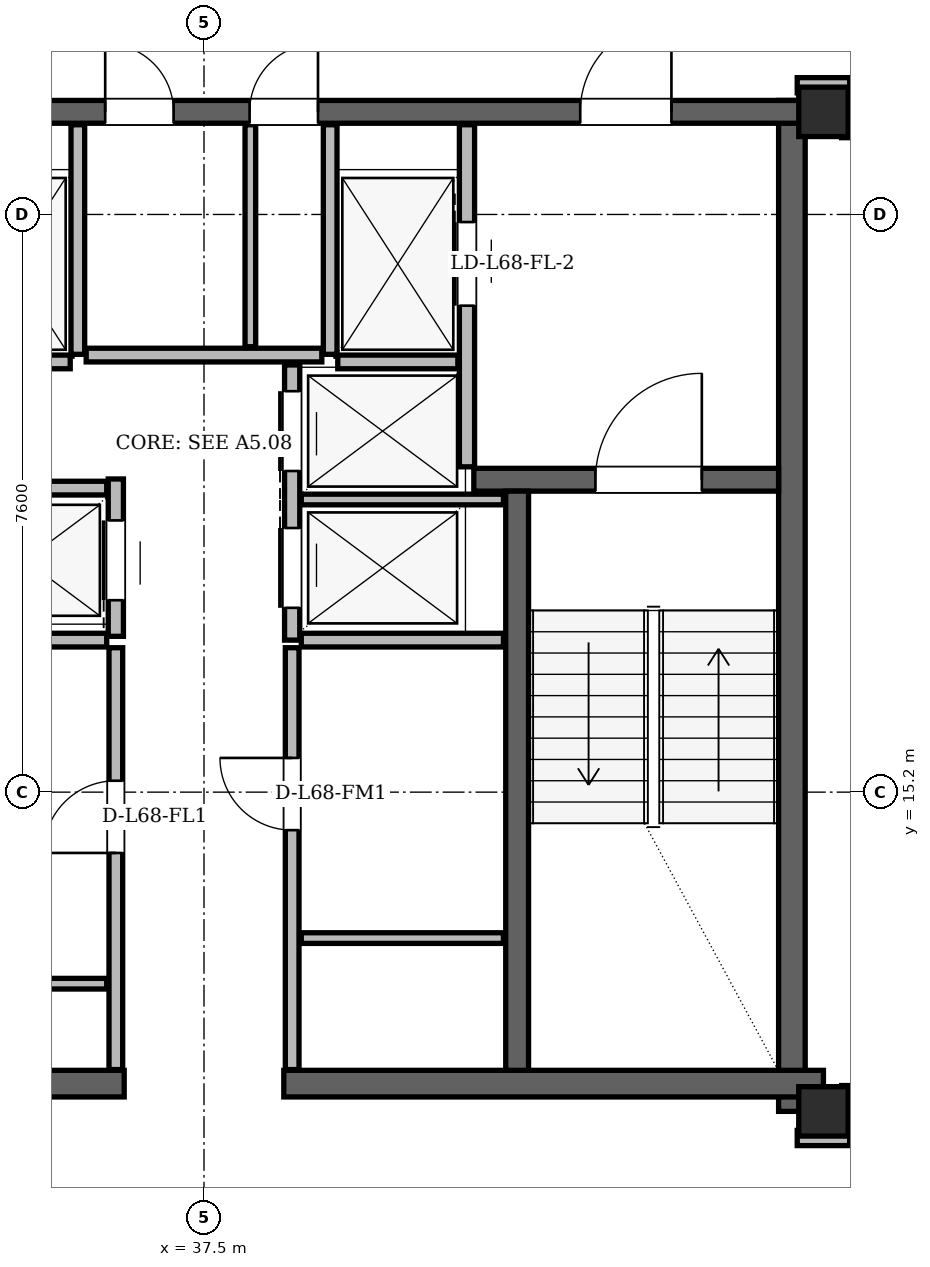
"""IFC4 building model, lengths in metres.
Left out: names, types, materials, properties, quantities, classifications, styles, units other than length and angle.
Written with IfcOpenShell. Run it as: python <this file> out.ifc"""

import sys

from ifc_helpers import new_model, si_unit, direction, frame, frame_2d, origin, origin_2d, place, context, subcontext, project, spatial, rectangle, hollow_rectangle, extrude, element, fill, save


model = new_model("IFC4")
c1 = context("Model", 3, precision=1e-05, world=origin(), true_north=direction((0.0, 1.0)))
c2 = subcontext(c1, "Body", "Model", "MODEL_VIEW")
j1 = project(units=[si_unit("LENGTHUNIT", "METRE"), si_unit("PLANEANGLEUNIT", "RADIAN")], contexts=[c1])
p1 = place(None, origin())
s1 = spatial("IfcSite", under=j1, at=p1, CompositionType="ELEMENT")
p2 = place(p1, origin())
s2 = spatial("IfcBuilding", under=s1, at=p2, CompositionType="ELEMENT")
p3 = place(p2, frame((0.0, 0.0, 257.7)))
s3 = spatial("IfcBuildingStorey", under=s2, at=p3, CompositionType="ELEMENT", Elevation=257.7)
for number, where, z_axis, x_axis in (
    (1, (45.65, 11.0, 0.0), (0.0, 0.0, 1.0), (1.0, 0.0, 0.0)),
    (2, (45.65, 24.15, 0.0), (0.0, 0.0, 1.0), (1.0, 0.0, 0.0)),
):
    element("IfcColumn", number, at=place(p3, frame(where, z_axis=z_axis, x_axis=x_axis)), inside=s3, PredefinedType="COLUMN", context=c2, shape_type="SweptSolid", body=[
        extrude(hollow_rectangle(XDim=0.65, YDim=0.65, WallThickness=0.05, at=origin_2d()), origin(), (0.0, 0.0, 1.0), 3.9),
    ])
p4 = place(p3, frame((45.235, 11.0, 0.0), z_axis=(0.0, 0.0, 1.0), x_axis=(0.0, 1.0, 0.0)))
e3 = element("IfcWall", 3, at=p4, inside=s3, PredefinedType="SHEAR", context=c2, shape_type="SweptSolid", body=[
    extrude(rectangle(XDim=13.3, YDim=0.35, at=frame_2d((6.65, 0.0))), origin(), (0.0, 0.0, 1.0), 3.68),
])
for number, where, z_axis, x_axis in (
    (4, (29.35, 11.365, 0.0), (0.0, 0.0, 1.0), (1.0, 0.0, 0.0)),
    (5, (38.55, 11.365, 0.0), (0.0, 0.0, 1.0), (1.0, 0.0, 0.0)),
):
    element("IfcWall", number, at=place(p3, frame(where, z_axis=z_axis, x_axis=x_axis)), inside=s3, PredefinedType="SHEAR", context=c2, shape_type="SweptSolid", body=[
        extrude(rectangle(XDim=7.1, YDim=0.35, at=frame_2d((3.55, 0.0))), origin(), (0.0, 0.0, 1.0), 3.68),
    ])
p5 = place(p3, frame((29.65, 24.15, 0.0), z_axis=(0.0, 0.0, 1.0), x_axis=(1.0, 0.0, 0.0)))
e6 = element("IfcWall", 6, at=p5, inside=s3, PredefinedType="SHEAR", context=c2, shape_type="SweptSolid", body=[
    extrude(rectangle(XDim=15.7, YDim=0.3, at=frame_2d((7.85, 0.0))), origin(), (0.0, 0.0, 1.0), 3.68),
])
p6 = place(p5, frame((1.7, 0.0, 0.0)))
e7 = element("IfcOpeningElement", 7, at=p6, cuts=e6, PredefinedType="OPENING", context=c2, shape_type="SweptSolid", body=[
    extrude(rectangle(XDim=1.2, YDim=2.2, at=frame_2d((0.6, 1.1))), frame((0.0, 0.15, 0.0), z_axis=(0.0, -1.0, 0.0), x_axis=(1.0, 0.0, 0.0)), (0.0, 0.0, 1.0), 0.3),
])
p7 = place(p5, frame((12.8, 0.0, 0.0)))
e8 = element("IfcOpeningElement", 8, at=p7, cuts=e6, PredefinedType="OPENING", context=c2, shape_type="SweptSolid", body=[
    extrude(rectangle(XDim=1.2, YDim=2.2, at=frame_2d((0.6, 1.1))), frame((0.0, 0.15, 0.0), z_axis=(0.0, -1.0, 0.0), x_axis=(1.0, 0.0, 0.0)), (0.0, 0.0, 1.0), 0.3),
])
p8 = place(p5, frame((6.55, 0.0, 0.0)))
e9 = element("IfcOpeningElement", 9, at=p8, cuts=e6, PredefinedType="OPENING", context=c2, shape_type="SweptSolid", body=[
    extrude(rectangle(XDim=0.9, YDim=2.05, at=frame_2d((0.45, 1.025))), frame((0.0, 0.15, 0.0), z_axis=(0.0, -1.0, 0.0), x_axis=(1.0, 0.0, 0.0)), (0.0, 0.0, 1.0), 0.3),
])
p9 = place(p5, frame((8.45, 0.0, 0.0)))
e10 = element("IfcOpeningElement", 10, at=p9, cuts=e6, PredefinedType="OPENING", context=c2, shape_type="SweptSolid", body=[
    extrude(rectangle(XDim=0.9, YDim=2.05, at=frame_2d((0.45, 1.025))), frame((0.0, 0.15, 0.0), z_axis=(0.0, -1.0, 0.0), x_axis=(1.0, 0.0, 0.0)), (0.0, 0.0, 1.0), 0.3),
])
p10 = place(p3, frame((41.05, 19.31, 0.0), z_axis=(0.0, 0.0, 1.0), x_axis=(1.0, 0.0, 0.0)))
e11 = element("IfcWall", 11, at=p10, inside=s3, PredefinedType="SHEAR", context=c2, shape_type="SweptSolid", body=[
    extrude(rectangle(XDim=4.01, YDim=0.3, at=frame_2d((2.005, 0.0))), origin(), (0.0, 0.0, 1.0), 3.68),
])
p11 = place(p10, frame((1.6, 0.0, 0.0)))
e12 = element("IfcOpeningElement", 12, at=p11, cuts=e11, PredefinedType="OPENING", context=c2, shape_type="SweptSolid", body=[
    extrude(rectangle(XDim=1.4, YDim=2.2, at=frame_2d((0.7, 1.1))), frame((0.0, 0.15, 0.0), z_axis=(0.0, -1.0, 0.0), x_axis=(1.0, 0.0, 0.0)), (0.0, 0.0, 1.0), 0.3),
])
p12 = place(p3, frame((41.62, 11.54, 0.0), z_axis=(0.0, 0.0, 1.0), x_axis=(0.0, 1.0, 0.0)))
e13 = element("IfcWall", 13, at=p12, inside=s3, PredefinedType="SHEAR", context=c2, shape_type="SweptSolid", body=[
    extrude(rectangle(XDim=7.62, YDim=0.3, at=frame_2d((3.81, 0.0))), origin(), (0.0, 0.0, 1.0), 3.68),
])
p13 = place(p3, frame((58.693, 10.886, 0.0), z_axis=(0.0, 0.0, 1.0), x_axis=(-0.500001564453, 0.866024500545, 0.0)))
e14 = element("IfcWall", 14, at=p13, inside=s3, PredefinedType="SOLIDWALL", context=c2, shape_type="SweptSolid", body=[
    extrude(rectangle(XDim=37.152, YDim=0.29, at=frame_2d((18.576, 0.0))), origin(), (0.0, 0.0, 1.0), 3.058),
])
p14 = place(p13, frame((6.789, 0.0, 0.0)))
e15 = element("IfcOpeningElement", 15, at=p14, cuts=e14, PredefinedType="OPENING", context=c2, shape_type="SweptSolid", body=[
    extrude(rectangle(XDim=1.5, YDim=2.2, at=frame_2d((0.75, 1.1))), frame((0.0, 0.145, 0.0), z_axis=(0.0, -1.0, 0.0), x_axis=(1.0, 0.0, 0.0)), (0.0, 0.0, 1.0), 0.29),
])
p15 = place(p13, frame((28.247, 0.0, 0.0)))
e16 = element("IfcOpeningElement", 16, at=p15, cuts=e14, PredefinedType="OPENING", context=c2, shape_type="SweptSolid", body=[
    extrude(rectangle(XDim=1.5, YDim=2.2, at=frame_2d((0.75, 1.1))), frame((0.0, 0.145, 0.0), z_axis=(0.0, -1.0, 0.0), x_axis=(1.0, 0.0, 0.0)), (0.0, 0.0, 1.0), 0.29),
])
p16 = place(p13, frame((12.305, 0.0, 0.85)))
e17 = element("IfcOpeningElement", 17, at=p16, cuts=e14, PredefinedType="OPENING", context=c2, shape_type="SweptSolid", body=[
    extrude(rectangle(XDim=2.6, YDim=1.95, at=frame_2d((1.3, 0.975))), frame((0.0, 0.145, 0.0), z_axis=(0.0, -1.0, 0.0), x_axis=(1.0, 0.0, 0.0)), (0.0, 0.0, 1.0), 0.29),
])
p17 = place(p13, frame((1.096, 0.0, 0.85)))
e18 = element("IfcOpeningElement", 18, at=p17, cuts=e14, PredefinedType="OPENING", context=c2, shape_type="SweptSolid", body=[
    extrude(rectangle(XDim=2.4, YDim=1.9, at=frame_2d((1.2, 0.95))), frame((0.0, 0.145, 0.0), z_axis=(0.0, -1.0, 0.0), x_axis=(1.0, 0.0, 0.0)), (0.0, 0.0, 1.0), 0.29),
])
p18 = place(p13, frame((33.401, 0.0, 0.85)))
e19 = element("IfcOpeningElement", 19, at=p18, cuts=e14, PredefinedType="OPENING", context=c2, shape_type="SweptSolid", body=[
    extrude(rectangle(XDim=1.2, YDim=1.48, at=frame_2d((0.6, 0.74))), frame((0.0, 0.145, 0.0), z_axis=(0.0, -1.0, 0.0), x_axis=(1.0, 0.0, 0.0)), (0.0, 0.0, 1.0), 0.29),
])
p19 = place(p13, frame((15.942, 0.0, 0.85)))
e20 = element("IfcOpeningElement", 20, at=p19, cuts=e14, PredefinedType="OPENING", context=c2, shape_type="SweptSolid", body=[
    extrude(rectangle(XDim=1.2, YDim=1.48, at=frame_2d((0.6, 0.74))), frame((0.0, 0.145, 0.0), z_axis=(0.0, -1.0, 0.0), x_axis=(1.0, 0.0, 0.0)), (0.0, 0.0, 1.0), 0.29),
])
p20 = place(p13, frame((23.43, 0.0, 0.85)))
e21 = element("IfcOpeningElement", 21, at=p20, cuts=e14, PredefinedType="OPENING", context=c2, shape_type="SweptSolid", body=[
    extrude(rectangle(XDim=1.2, YDim=1.48, at=frame_2d((0.6, 0.74))), frame((0.0, 0.145, 0.0), z_axis=(0.0, -1.0, 0.0), x_axis=(1.0, 0.0, 0.0)), (0.0, 0.0, 1.0), 0.29),
])
p21 = place(p3, frame((35.84, 20.96, 0.0), z_axis=(0.0, 0.0, 1.0), x_axis=(0.0, 1.0, 0.0)))
e22 = element("IfcWall", 22, at=p21, inside=s3, PredefinedType="PARTITIONING", context=c2, shape_type="SweptSolid", body=[
    extrude(rectangle(XDim=3.02, YDim=0.18, at=frame_2d((1.51, 0.0))), origin(), (0.0, 0.0, 1.0), 3.68),
])
p22 = place(p3, frame((34.16, 20.86, 0.0), z_axis=(0.0, 0.0, 1.0), x_axis=(1.0, 0.0, 0.0)))
e23 = element("IfcWall", 23, at=p22, inside=s3, PredefinedType="PARTITIONING", context=c2, shape_type="SweptSolid", body=[
    extrude(rectangle(XDim=1.58, YDim=0.18, at=frame_2d((0.79, 0.0))), origin(), (0.0, 0.0, 1.0), 3.68),
])
p23 = place(p3, frame((40.96, 19.48, 0.0), z_axis=(0.0, 0.0, 1.0), x_axis=(0.0, 1.0, 0.0)))
e24 = element("IfcWall", 24, at=p23, inside=s3, PredefinedType="PARTITIONING", context=c2, shape_type="SweptSolid", body=[
    extrude(rectangle(XDim=4.5, YDim=0.2, at=frame_2d((2.25, 0.0))), origin(), (0.0, 0.0, 1.0), 3.68),
])
p24 = place(p23, frame((2.12, 0.0, 0.0)))
e25 = element("IfcOpeningElement", 25, at=p24, cuts=e24, PredefinedType="OPENING", context=c2, shape_type="SweptSolid", body=[
    extrude(rectangle(XDim=1.1, YDim=2.2, at=frame_2d((0.55, 1.1))), frame((0.0, 0.1, 0.0), z_axis=(0.0, -1.0, 0.0), x_axis=(1.0, 0.0, 0.0)), (0.0, 0.0, 1.0), 0.2),
])
p25 = place(p3, frame((39.16, 20.96, 0.0), z_axis=(0.0, 0.0, 1.0), x_axis=(0.0, 1.0, 0.0)))
e26 = element("IfcWall", 26, at=p25, inside=s3, PredefinedType="PARTITIONING", context=c2, shape_type="SweptSolid", body=[
    extrude(rectangle(XDim=3.02, YDim=0.18, at=frame_2d((1.51, 0.0))), origin(), (0.0, 0.0, 1.0), 3.68),
])
p26 = place(p3, frame((39.26, 20.86, 0.0), z_axis=(0.0, 0.0, 1.0), x_axis=(1.0, 0.0, 0.0)))
e27 = element("IfcWall", 27, at=p26, inside=s3, PredefinedType="PARTITIONING", context=c2, shape_type="SweptSolid", body=[
    extrude(rectangle(XDim=1.58, YDim=0.18, at=frame_2d((0.79, 0.0))), origin(), (0.0, 0.0, 1.0), 3.68),
])
p27 = place(p3, frame((36.34, 17.25, 0.0), z_axis=(0.0, 0.0, 1.0), x_axis=(0.0, 1.0, 0.0)))
e28 = element("IfcWall", 28, at=p27, inside=s3, PredefinedType="PARTITIONING", context=c2, shape_type="SweptSolid", body=[
    extrude(rectangle(XDim=2.07, YDim=0.2, at=frame_2d((1.035, 0.0))), origin(), (0.0, 0.0, 1.0), 3.68),
])
p28 = place(p27, frame((0.475, 0.0, 0.0)))
e29 = element("IfcOpeningElement", 29, at=p28, cuts=e28, PredefinedType="OPENING", context=c2, shape_type="SweptSolid", body=[
    extrude(rectangle(XDim=1.05, YDim=2.15, at=frame_2d((0.525, 1.075))), frame((0.0, 0.1, 0.0), z_axis=(0.0, -1.0, 0.0), x_axis=(1.0, 0.0, 0.0)), (0.0, 0.0, 1.0), 0.2),
])
p29 = place(p3, frame((33.95, 19.2, 0.0), z_axis=(0.0, 0.0, 1.0), x_axis=(1.0, 0.0, 0.0)))
e30 = element("IfcWall", 30, at=p29, inside=s3, PredefinedType="PARTITIONING", context=c2, shape_type="SweptSolid", body=[
    extrude(rectangle(XDim=2.27, YDim=0.18, at=frame_2d((1.135, 0.0))), origin(), (0.0, 0.0, 1.0), 3.68),
])
p30 = place(p3, frame((33.56, 17.2, 0.0), z_axis=(0.0, 0.0, 1.0), x_axis=(1.0, 0.0, 0.0)))
e31 = element("IfcWall", 31, at=p30, inside=s3, PredefinedType="PARTITIONING", context=c2, shape_type="SweptSolid", body=[
    extrude(rectangle(XDim=2.66, YDim=0.18, at=frame_2d((1.33, 0.0))), origin(), (0.0, 0.0, 1.0), 3.68),
])
p31 = place(p3, frame((36.34, 11.55, 0.0), z_axis=(0.0, 0.0, 1.0), x_axis=(0.0, 1.0, 0.0)))
e32 = element("IfcWall", 32, at=p31, inside=s3, PredefinedType="PARTITIONING", context=c2, shape_type="SweptSolid", body=[
    extrude(rectangle(XDim=5.55, YDim=0.18, at=frame_2d((2.775, 0.0))), origin(), (0.0, 0.0, 1.0), 3.68),
])
p32 = place(p31, frame((2.85, 0.0, 0.0)))
e33 = element("IfcOpeningElement", 33, at=p32, cuts=e32, PredefinedType="OPENING", context=c2, shape_type="SweptSolid", body=[
    extrude(rectangle(XDim=0.95, YDim=2.1, at=frame_2d((0.475, 1.05))), frame((0.0, 0.09, 0.0), z_axis=(0.0, -1.0, 0.0), x_axis=(1.0, 0.0, 0.0)), (0.0, 0.0, 1.0), 0.18),
])
p33 = place(p3, frame((33.56, 12.68, 0.0), z_axis=(0.0, 0.0, 1.0), x_axis=(1.0, 0.0, 0.0)))
e34 = element("IfcWall", 34, at=p33, inside=s3, PredefinedType="PARTITIONING", context=c2, shape_type="SweptSolid", body=[
    extrude(rectangle(XDim=2.66, YDim=0.14, at=frame_2d((1.33, 0.0))), origin(), (0.0, 0.0, 1.0), 3.68),
])
p34 = place(p3, frame((38.66, 17.2, 0.0), z_axis=(0.0, 0.0, 1.0), x_axis=(0.0, 1.0, 0.0)))
e35 = element("IfcWall", 35, at=p34, inside=s3, PredefinedType="PARTITIONING", context=c2, shape_type="SweptSolid", body=[
    extrude(rectangle(XDim=3.62, YDim=0.2, at=frame_2d((1.81, 0.0))), origin(), (0.0, 0.0, 1.0), 3.68),
])
p35 = place(p34, frame((0.425, 0.0, 0.0)))
e36 = element("IfcOpeningElement", 36, at=p35, cuts=e35, PredefinedType="OPENING", context=c2, shape_type="SweptSolid", body=[
    extrude(rectangle(XDim=1.05, YDim=2.15, at=frame_2d((0.525, 1.075))), frame((0.0, 0.1, 0.0), z_axis=(0.0, -1.0, 0.0), x_axis=(1.0, 0.0, 0.0)), (0.0, 0.0, 1.0), 0.2),
])
p36 = place(p34, frame((2.225, 0.0, 0.0)))
e37 = element("IfcOpeningElement", 37, at=p36, cuts=e35, PredefinedType="OPENING", context=c2, shape_type="SweptSolid", body=[
    extrude(rectangle(XDim=1.05, YDim=2.15, at=frame_2d((0.525, 1.075))), frame((0.0, 0.1, 0.0), z_axis=(0.0, -1.0, 0.0), x_axis=(1.0, 0.0, 0.0)), (0.0, 0.0, 1.0), 0.2),
])
p37 = place(p3, frame((38.78, 17.2, 0.0), z_axis=(0.0, 0.0, 1.0), x_axis=(1.0, 0.0, 0.0)))
e38 = element("IfcWall", 38, at=p37, inside=s3, PredefinedType="PARTITIONING", context=c2, shape_type="SweptSolid", body=[
    extrude(rectangle(XDim=2.66, YDim=0.18, at=frame_2d((1.33, 0.0))), origin(), (0.0, 0.0, 1.0), 3.68),
])
p38 = place(p3, frame((38.78, 19.05, 0.0), z_axis=(0.0, 0.0, 1.0), x_axis=(1.0, 0.0, 0.0)))
e39 = element("IfcWall", 39, at=p38, inside=s3, PredefinedType="PARTITIONING", context=c2, shape_type="SweptSolid", body=[
    extrude(rectangle(XDim=2.66, YDim=0.14, at=frame_2d((1.33, 0.0))), origin(), (0.0, 0.0, 1.0), 3.68),
])
p39 = place(p3, frame((38.66, 11.55, 0.0), z_axis=(0.0, 0.0, 1.0), x_axis=(0.0, 1.0, 0.0)))
e40 = element("IfcWall", 40, at=p39, inside=s3, PredefinedType="PARTITIONING", context=c2, shape_type="SweptSolid", body=[
    extrude(rectangle(XDim=5.55, YDim=0.18, at=frame_2d((2.775, 0.0))), origin(), (0.0, 0.0, 1.0), 3.68),
])
p40 = place(p39, frame((3.15, 0.0, 0.0)))
e41 = element("IfcOpeningElement", 41, at=p40, cuts=e40, PredefinedType="OPENING", context=c2, shape_type="SweptSolid", body=[
    extrude(rectangle(XDim=0.95, YDim=2.1, at=frame_2d((0.475, 1.05))), frame((0.0, 0.09, 0.0), z_axis=(0.0, -1.0, 0.0), x_axis=(1.0, 0.0, 0.0)), (0.0, 0.0, 1.0), 0.18),
])
p41 = place(p3, frame((38.78, 13.28, 0.0), z_axis=(0.0, 0.0, 1.0), x_axis=(1.0, 0.0, 0.0)))
e42 = element("IfcWall", 42, at=p41, inside=s3, PredefinedType="PARTITIONING", context=c2, shape_type="SweptSolid", body=[
    extrude(rectangle(XDim=2.66, YDim=0.14, at=frame_2d((1.33, 0.0))), origin(), (0.0, 0.0, 1.0), 3.68),
])
p42 = place(p3, frame((35.95, 20.95, 0.0), z_axis=(0.0, 0.0, 1.0), x_axis=(1.0, 0.0, 0.0)))
e43 = element("IfcWall", 43, at=p42, inside=s3, PredefinedType="PARTITIONING", context=c2, shape_type="SweptSolid", body=[
    extrude(rectangle(XDim=3.1, YDim=0.18, at=frame_2d((1.55, 0.0))), origin(), (0.0, 0.0, 1.0), 3.68),
])
p43 = place(p3, frame((38.11, 21.06, 0.0), z_axis=(0.0, 0.0, 1.0), x_axis=(0.0, 1.0, 0.0)))
e44 = element("IfcWall", 44, at=p43, inside=s3, PredefinedType="PARTITIONING", context=c2, shape_type="SweptSolid", body=[
    extrude(rectangle(XDim=2.92, YDim=0.14, at=frame_2d((1.46, 0.0))), origin(), (0.0, 0.0, 1.0), 3.68),
])
p44 = place(p3, frame((45.305, 10.65, 0.0), z_axis=(0.0, 0.0, 1.0), x_axis=(1.0, 0.0, 0.0)))
e45 = element("IfcWall", 45, at=p44, inside=s3, PredefinedType="PARTITIONING", context=c2, shape_type="SweptSolid", body=[
    extrude(rectangle(XDim=0.69, YDim=0.2, at=frame_2d((0.345, 0.0))), origin(), (0.0, 0.0, 1.0), 3.68),
])
p45 = place(p3, frame((45.305, 24.5, 0.0), z_axis=(0.0, 0.0, 1.0), x_axis=(1.0, 0.0, 0.0)))
e46 = element("IfcWall", 46, at=p45, inside=s3, PredefinedType="PARTITIONING", context=c2, shape_type="SweptSolid", body=[
    extrude(rectangle(XDim=0.69, YDim=0.2, at=frame_2d((0.345, 0.0))), origin(), (0.0, 0.0, 1.0), 3.266),
])
p46 = place(p3, frame((45.99, 10.95, 0.0), z_axis=(0.0, 0.0, 1.0), x_axis=(0.0, 1.0, 0.0)))
e47 = element("IfcWall", 47, at=p46, inside=s3, PredefinedType="PARTITIONING", context=c2, shape_type="SweptSolid", body=[
    extrude(rectangle(XDim=0.39, YDim=0.2, at=frame_2d((0.195, 0.0))), origin(), (0.0, 0.0, 1.0), 3.266),
])
p47 = place(p3, frame((45.99, 23.81, 0.0), z_axis=(0.0, 0.0, 1.0), x_axis=(0.0, 1.0, 0.0)))
e48 = element("IfcWall", 48, at=p47, inside=s3, PredefinedType="PARTITIONING", context=c2, shape_type="SweptSolid", body=[
    extrude(rectangle(XDim=0.51, YDim=0.2, at=frame_2d((0.255, 0.0))), origin(), (0.0, 0.0, 1.0), 3.68),
])
p48 = place(p32, origin())
e49 = element("IfcDoor", 49, at=p48, inside=s3, OperationType="SINGLE_SWING_LEFT", PredefinedType="DOOR", context=c2, shape_type="SweptSolid", body=[
    extrude(rectangle(XDim=0.95, YDim=2.1, at=frame_2d((0.475, 1.05))), frame((0.0, 0.025, 0.0), z_axis=(0.0, -1.0, 0.0), x_axis=(1.0, 0.0, 0.0)), (0.0, 0.0, 1.0), 0.05),
])
fill(e33, e49)
p49 = place(p40, origin())
e50 = element("IfcDoor", 50, at=p49, inside=s3, OperationType="SINGLE_SWING_RIGHT", PredefinedType="DOOR", context=c2, shape_type="SweptSolid", body=[
    extrude(rectangle(XDim=0.95, YDim=2.1, at=frame_2d((0.475, 1.05))), frame((0.0, 0.025, 0.0), z_axis=(0.0, -1.0, 0.0), x_axis=(1.0, 0.0, 0.0)), (0.0, 0.0, 1.0), 0.05),
])
fill(e41, e50)
p50 = place(p24, origin())
e51 = element("IfcDoor", 51, at=p50, inside=s3, OperationType="SLIDING_TO_RIGHT", PredefinedType="DOOR", context=c2, shape_type="SweptSolid", body=[
    extrude(rectangle(XDim=1.1, YDim=2.2, at=frame_2d((0.55, 1.1))), frame((0.0, 0.025, 0.0), z_axis=(0.0, -1.0, 0.0), x_axis=(1.0, 0.0, 0.0)), (0.0, 0.0, 1.0), 0.05),
])
fill(e25, e51)
p51 = place(p28, origin())
e52 = element("IfcDoor", 52, at=p51, inside=s3, OperationType="SLIDING_TO_LEFT", PredefinedType="DOOR", context=c2, shape_type="SweptSolid", body=[
    extrude(rectangle(XDim=1.05, YDim=2.15, at=frame_2d((0.525, 1.075))), frame((0.0, 0.025, 0.0), z_axis=(0.0, -1.0, 0.0), x_axis=(1.0, 0.0, 0.0)), (0.0, 0.0, 1.0), 0.05),
])
fill(e29, e52)
p52 = place(p35, origin())
e53 = element("IfcDoor", 53, at=p52, inside=s3, OperationType="SLIDING_TO_RIGHT", PredefinedType="DOOR", context=c2, shape_type="SweptSolid", body=[
    extrude(rectangle(XDim=1.05, YDim=2.15, at=frame_2d((0.525, 1.075))), frame((0.0, 0.025, 0.0), z_axis=(0.0, -1.0, 0.0), x_axis=(1.0, 0.0, 0.0)), (0.0, 0.0, 1.0), 0.05),
])
fill(e36, e53)
p53 = place(p36, origin())
e54 = element("IfcDoor", 54, at=p53, inside=s3, OperationType="SLIDING_TO_LEFT", PredefinedType="DOOR", context=c2, shape_type="SweptSolid", body=[
    extrude(rectangle(XDim=1.05, YDim=2.15, at=frame_2d((0.525, 1.075))), frame((0.0, 0.025, 0.0), z_axis=(0.0, -1.0, 0.0), x_axis=(1.0, 0.0, 0.0)), (0.0, 0.0, 1.0), 0.05),
])
fill(e37, e54)
p54 = place(p11, origin())
e55 = element("IfcDoor", 55, at=p54, inside=s3, OperationType="SINGLE_SWING_RIGHT", PredefinedType="DOOR", context=c2, shape_type="SweptSolid", body=[
    extrude(rectangle(XDim=1.4, YDim=2.2, at=frame_2d((0.7, 1.1))), frame((0.0, 0.025, 0.0), z_axis=(0.0, -1.0, 0.0), x_axis=(1.0, 0.0, 0.0)), (0.0, 0.0, 1.0), 0.05),
])
fill(e12, e55)
p55 = place(p7, origin())
e56 = element("IfcDoor", 56, at=p55, inside=s3, OperationType="SINGLE_SWING_RIGHT", PredefinedType="DOOR", context=c2, shape_type="SweptSolid", body=[
    extrude(rectangle(XDim=1.2, YDim=2.2, at=frame_2d((0.6, 1.1))), frame((0.0, 0.025, 0.0), z_axis=(0.0, -1.0, 0.0), x_axis=(1.0, 0.0, 0.0)), (0.0, 0.0, 1.0), 0.05),
])
fill(e8, e56)
p56 = place(p8, origin())
e57 = element("IfcDoor", 57, at=p56, inside=s3, OperationType="SINGLE_SWING_LEFT", PredefinedType="DOOR", context=c2, shape_type="SweptSolid", body=[
    extrude(rectangle(XDim=0.9, YDim=2.05, at=frame_2d((0.45, 1.025))), frame((0.0, 0.025, 0.0), z_axis=(0.0, -1.0, 0.0), x_axis=(1.0, 0.0, 0.0)), (0.0, 0.0, 1.0), 0.05),
])
fill(e9, e57)
p57 = place(p9, origin())
e58 = element("IfcDoor", 58, at=p57, inside=s3, OperationType="SINGLE_SWING_RIGHT", PredefinedType="DOOR", context=c2, shape_type="SweptSolid", body=[
    extrude(rectangle(XDim=0.9, YDim=2.05, at=frame_2d((0.45, 1.025))), frame((0.0, 0.025, 0.0), z_axis=(0.0, -1.0, 0.0), x_axis=(1.0, 0.0, 0.0)), (0.0, 0.0, 1.0), 0.05),
])
fill(e10, e58)
save(model, sys.argv[1])
